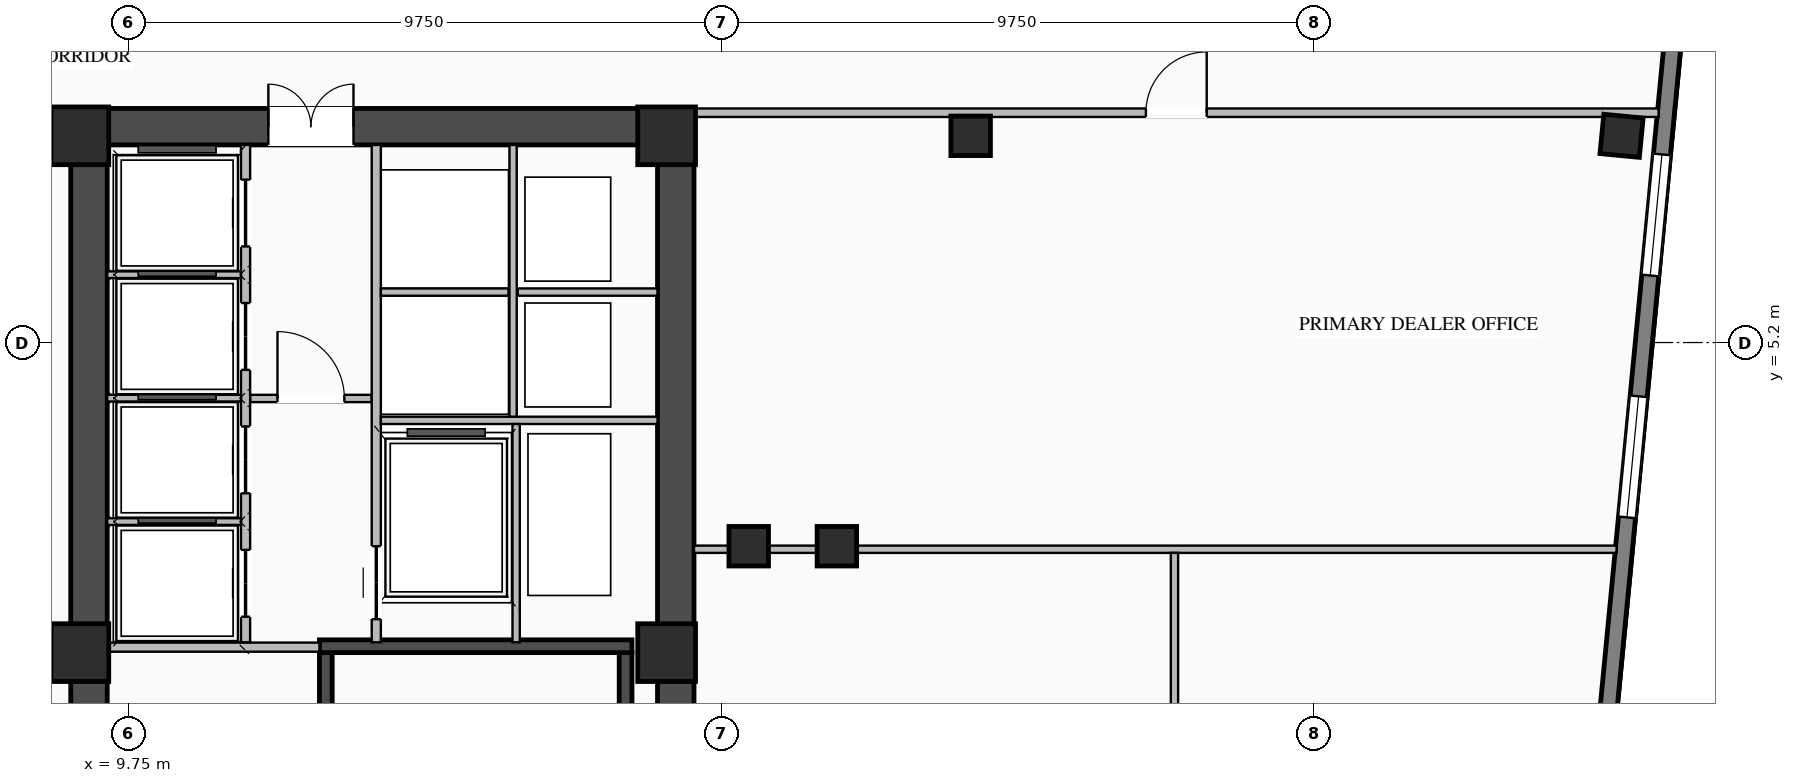
"""IFC4 building model, lengths in metres.
Left out: names, types, materials, properties, quantities, classifications, styles, units other than length and angle.
Written with IfcOpenShell. Run it as: python <this file> out.ifc"""

import sys

from ifc_helpers import new_model, si_unit, direction, frame, frame_2d, origin, origin_2d, place, context, subcontext, project, spatial, rectangle, i_section, extrude, element, fill, save


model = new_model("IFC4")
c1 = context("Model", 3, precision=1e-05, world=origin(), true_north=direction((0.0, 1.0)))
c2 = subcontext(c1, "Body", "Model", "MODEL_VIEW")
j1 = project(units=[si_unit("LENGTHUNIT", "METRE"), si_unit("PLANEANGLEUNIT", "RADIAN")], contexts=[c1])
p1 = place(None, origin())
s1 = spatial("IfcSite", under=j1, at=p1, CompositionType="ELEMENT")
p2 = place(p1, origin())
s2 = spatial("IfcBuilding", under=s1, at=p2, CompositionType="ELEMENT")
p3 = place(p2, frame((0.0, 0.0, 181.1)))
s3 = spatial("IfcBuildingStorey", under=s2, at=p3, CompositionType="ELEMENT", Elevation=181.1)
p4 = place(p3, frame((8.8, 8.75, 0.0), z_axis=(0.0, 0.0, 1.0), x_axis=(1.0, 0.0, 0.0)))
e1 = element("IfcWall", 1, at=p4, inside=s3, PredefinedType="SHEAR", context=c2, shape_type="SweptSolid", body=[
    extrude(rectangle(XDim=10.25, YDim=0.6, at=frame_2d((5.125, 0.0))), origin(), (0.0, 0.0, 1.0), 3.27),
])
p5 = place(p4, frame((3.25, 0.0, 0.0)))
e2 = element("IfcOpeningElement", 2, at=p5, cuts=e1, PredefinedType="OPENING", context=c2, shape_type="SweptSolid", body=[
    extrude(rectangle(XDim=1.4, YDim=2.05, at=frame_2d((0.7, 1.025))), frame((0.0, 0.31, 0.0), z_axis=(0.0, -1.0, 0.0), x_axis=(1.0, 0.0, 0.0)), (0.0, 0.0, 1.0), 0.62),
])
p6 = place(p3, frame((9.1, -8.45, 0.0), z_axis=(0.0, 0.0, 1.0), x_axis=(0.0, 1.0, 0.0)))
e3 = element("IfcWall", 3, at=p6, inside=s3, PredefinedType="SHEAR", context=c2, shape_type="SweptSolid", body=[
    extrude(rectangle(XDim=16.9, YDim=0.6, at=frame_2d((8.45, 0.0))), origin(), (0.0, 0.0, 1.0), 3.27),
])
p7 = place(p6, frame((5.2, 0.0, 0.0)))
e4 = element("IfcOpeningElement", 4, at=p7, cuts=e3, PredefinedType="OPENING", context=c2, shape_type="SweptSolid", body=[
    extrude(rectangle(XDim=1.1, YDim=2.08, at=frame_2d((0.55, 1.04))), frame((0.0, 0.31, 0.0), z_axis=(0.0, -1.0, 0.0), x_axis=(1.0, 0.0, 0.0)), (0.0, 0.0, 1.0), 0.62),
])
p8 = place(p3, frame((18.75, -8.45, 0.0), z_axis=(0.0, 0.0, 1.0), x_axis=(0.0, 1.0, 0.0)))
e5 = element("IfcWall", 5, at=p8, inside=s3, PredefinedType="SHEAR", context=c2, shape_type="SweptSolid", body=[
    extrude(rectangle(XDim=16.9, YDim=0.6, at=frame_2d((8.45, 0.0))), origin(), (0.0, 0.0, 1.0), 3.27),
])
p9 = place(p3, frame((12.995, -8.1, 0.0), z_axis=(0.0, 0.0, 1.0), x_axis=(0.0, 1.0, 0.0)))
e6 = element("IfcWall", 6, at=p9, inside=s3, PredefinedType="SHEAR", context=c2, shape_type="SweptSolid", body=[
    extrude(rectangle(XDim=8.2, YDim=0.21, at=frame_2d((4.1, 0.0))), origin(), (0.0, 0.0, 1.0), 3.27),
])
p10 = place(p9, frame((6.25, 0.0, 0.0)))
e7 = element("IfcOpeningElement", 7, at=p10, cuts=e6, PredefinedType="OPENING", context=c2, shape_type="SweptSolid", body=[
    extrude(rectangle(XDim=1.1, YDim=2.15, at=frame_2d((0.55, 1.075))), frame((0.0, 0.115, 0.0), z_axis=(0.0, -1.0, 0.0), x_axis=(1.0, 0.0, 0.0)), (0.0, 0.0, 1.0), 0.23),
])
p11 = place(p3, frame((17.925, -8.1, 0.0), z_axis=(0.0, 0.0, 1.0), x_axis=(0.0, 1.0, 0.0)))
e8 = element("IfcWall", 8, at=p11, inside=s3, PredefinedType="SHEAR", context=c2, shape_type="SweptSolid", body=[
    extrude(rectangle(XDim=8.2, YDim=0.21, at=frame_2d((4.1, 0.0))), origin(), (0.0, 0.0, 1.0), 3.27),
])
p12 = place(p3, frame((18.03, 0.205, 0.0), z_axis=(0.0, 0.0, 1.0), x_axis=(-1.0, 0.0, 0.0)))
e9 = element("IfcWall", 9, at=p12, inside=s3, PredefinedType="SHEAR", context=c2, shape_type="SweptSolid", body=[
    extrude(rectangle(XDim=5.14, YDim=0.21, at=frame_2d((2.57, 0.0))), origin(), (0.0, 0.0, 1.0), 3.27),
])
for number, where, z_axis, x_axis in (
    (10, (8.95, 0.1, 0.0), (0.0, 0.0, 1.0), (1.0, 0.0, 0.0)),
    (11, (8.95, 8.6, 0.0), (0.0, 0.0, 1.0), (1.0, 0.0, 0.0)),
    (12, (18.6, 0.1, 0.0), (0.0, 0.0, 1.0), (1.0, 0.0, 0.0)),
    (13, (18.6, 8.6, 0.0), (0.0, 0.0, 1.0), (1.0, 0.0, 0.0)),
):
    element("IfcColumn", number, at=place(p3, frame(where, z_axis=z_axis, x_axis=x_axis)), inside=s3, PredefinedType="COLUMN", context=c2, shape_type="SweptSolid", body=[
        extrude(rectangle(XDim=0.95, YDim=0.95, at=origin_2d()), origin(), (0.0, 0.0, 1.0), 3.45),
    ])
for number, where, z_axis, x_axis in (
    (14, (19.95, 1.85, 0.0), (0.0, 0.0, 1.0), (1.0, 0.0, 0.0)),
    (15, (21.4, 1.85, 0.0), (0.0, 0.0, 1.0), (1.0, 0.0, 0.0)),
    (16, (23.6, 8.6, 0.0), (0.0, 0.0, 1.0), (1.0, 0.0, 0.0)),
    (17, (34.305, 8.6, 0.0), (0.0, 0.0, 1.0), (0.995, -0.096, 0.0)),
):
    element("IfcColumn", number, at=place(p3, frame(where, z_axis=z_axis, x_axis=x_axis)), inside=s3, PredefinedType="COLUMN", context=c2, shape_type="SweptSolid", body=[
        extrude(i_section(OverallWidth=0.65, OverallDepth=0.65, WebThickness=0.028, FlangeThickness=0.04, at=origin_2d()), origin(), (0.0, 0.0, 1.0), 3.45),
    ])
p13 = place(p3, frame((35.51, 13.914, 0.0), z_axis=(0.0, 0.0, 1.0), x_axis=(-0.095839027265, -0.995396845913, 0.0)))
e18 = element("IfcWall", 18, at=p13, inside=s3, PredefinedType="STANDARD", context=c2, shape_type="SweptSolid", body=[
    extrude(rectangle(XDim=16.79, YDim=0.28, at=frame_2d((8.395, 0.0))), origin(), (0.0, 0.0, 1.0), 3.25),
])
p14 = place(p13, frame((5.647, 0.0, 0.76)))
e19 = element("IfcOpeningElement", 19, at=p14, cuts=e18, PredefinedType="OPENING", context=c2, shape_type="SweptSolid", body=[
    extrude(rectangle(XDim=2.0, YDim=2.05, at=frame_2d((1.0, 1.025))), frame((0.0, 0.15, 0.0), z_axis=(0.0, -1.0, 0.0), x_axis=(1.0, 0.0, 0.0)), (0.0, 0.0, 1.0), 0.3),
])
p15 = place(p13, frame((9.643, 0.0, 0.76)))
e20 = element("IfcOpeningElement", 20, at=p15, cuts=e18, PredefinedType="OPENING", context=c2, shape_type="SweptSolid", body=[
    extrude(rectangle(XDim=2.0, YDim=2.05, at=frame_2d((1.0, 1.025))), frame((0.0, 0.15, 0.0), z_axis=(0.0, -1.0, 0.0), x_axis=(1.0, 0.0, 0.0)), (0.0, 0.0, 1.0), 0.3),
])
p16 = place(p3, frame((9.4, 0.19, 0.0), z_axis=(0.0, 0.0, 1.0), x_axis=(1.0, 0.0, 0.0)))
e21 = element("IfcWall", 21, at=p16, inside=s3, PredefinedType="STANDARD", context=c2, shape_type="SweptSolid", body=[
    extrude(rectangle(XDim=3.49, YDim=0.15, at=frame_2d((1.745, 0.0))), origin(), (0.0, 0.0, 1.0), 2.645),
])
p17 = place(p3, frame((11.75, 4.28, 0.0), z_axis=(0.0, 0.0, 1.0), x_axis=(1.0, 0.0, 0.0)))
e22 = element("IfcWall", 22, at=p17, inside=s3, PredefinedType="STANDARD", context=c2, shape_type="SweptSolid", body=[
    extrude(rectangle(XDim=2.0, YDim=0.12, at=frame_2d((1.0, 0.0))), origin(), (0.0, 0.0, 1.0), 3.25),
])
p18 = place(p17, frame((0.45, 0.0, 0.0)))
e23 = element("IfcOpeningElement", 23, at=p18, cuts=e22, PredefinedType="OPENING", context=c2, shape_type="SweptSolid", body=[
    extrude(rectangle(XDim=1.1, YDim=2.1, at=frame_2d((0.55, 1.05))), frame((0.0, 0.07, 0.0), z_axis=(0.0, -1.0, 0.0), x_axis=(1.0, 0.0, 0.0)), (0.0, 0.0, 1.0), 0.14),
])
p19 = place(p3, frame((11.675, 0.27, 0.0), z_axis=(0.0, 0.0, 1.0), x_axis=(0.0, 1.0, 0.0)))
e24 = element("IfcWall", 24, at=p19, inside=s3, PredefinedType="STANDARD", context=c2, shape_type="SweptSolid", body=[
    extrude(rectangle(XDim=8.18, YDim=0.15, at=frame_2d((4.09, 0.0))), origin(), (0.0, 0.0, 1.0), 3.25),
])
p20 = place(p19, frame((0.42, 0.0, 0.0)))
e25 = element("IfcOpeningElement", 25, at=p20, cuts=e24, PredefinedType="OPENING", context=c2, shape_type="SweptSolid", body=[
    extrude(rectangle(XDim=1.1, YDim=2.1, at=frame_2d((0.55, 1.05))), frame((0.0, 0.085, 0.0), z_axis=(0.0, -1.0, 0.0), x_axis=(1.0, 0.0, 0.0)), (0.0, 0.0, 1.0), 0.17),
])
p21 = place(p19, frame((2.45, 0.0, 0.0)))
e26 = element("IfcOpeningElement", 26, at=p21, cuts=e24, PredefinedType="OPENING", context=c2, shape_type="SweptSolid", body=[
    extrude(rectangle(XDim=1.1, YDim=2.1, at=frame_2d((0.55, 1.05))), frame((0.0, 0.085, 0.0), z_axis=(0.0, -1.0, 0.0), x_axis=(1.0, 0.0, 0.0)), (0.0, 0.0, 1.0), 0.17),
])
p22 = place(p19, frame((4.48, 0.0, 0.0)))
e27 = element("IfcOpeningElement", 27, at=p22, cuts=e24, PredefinedType="OPENING", context=c2, shape_type="SweptSolid", body=[
    extrude(rectangle(XDim=1.1, YDim=2.1, at=frame_2d((0.55, 1.05))), frame((0.0, 0.085, 0.0), z_axis=(0.0, -1.0, 0.0), x_axis=(1.0, 0.0, 0.0)), (0.0, 0.0, 1.0), 0.17),
])
p23 = place(p19, frame((6.51, 0.0, 0.0)))
e28 = element("IfcOpeningElement", 28, at=p23, cuts=e24, PredefinedType="OPENING", context=c2, shape_type="SweptSolid", body=[
    extrude(rectangle(XDim=1.1, YDim=2.1, at=frame_2d((0.55, 1.05))), frame((0.0, 0.085, 0.0), z_axis=(0.0, -1.0, 0.0), x_axis=(1.0, 0.0, 0.0)), (0.0, 0.0, 1.0), 0.17),
])
for number, where, z_axis, x_axis in (
    (29, (9.4, 2.255, 0.0), (0.0, 0.0, 1.0), (1.0, 0.0, 0.0)),
    (30, (9.4, 4.285, 0.0), (0.0, 0.0, 1.0), (1.0, 0.0, 0.0)),
    (31, (9.4, 6.315, 0.0), (0.0, 0.0, 1.0), (1.0, 0.0, 0.0)),
):
    element("IfcWall", number, at=place(p3, frame(where, z_axis=z_axis, x_axis=x_axis)), inside=s3, PredefinedType="STANDARD", context=c2, shape_type="SweptSolid", body=[
        extrude(rectangle(XDim=2.2, YDim=0.11, at=frame_2d((1.1, 0.0))), origin(), (0.0, 0.0, 1.0), 3.25),
    ])
p24 = place(p3, frame((13.825, 0.27, 0.0), z_axis=(0.0, 0.0, 1.0), x_axis=(0.0, 1.0, 0.0)))
e32 = element("IfcWall", 32, at=p24, inside=s3, PredefinedType="STANDARD", context=c2, shape_type="SweptSolid", body=[
    extrude(rectangle(XDim=8.18, YDim=0.15, at=frame_2d((4.09, 0.0))), origin(), (0.0, 0.0, 1.0), 3.25),
])
p25 = place(p24, frame((0.38, 0.0, 0.0)))
e33 = element("IfcOpeningElement", 33, at=p25, cuts=e32, PredefinedType="OPENING", context=c2, shape_type="SweptSolid", body=[
    extrude(rectangle(XDim=1.2, YDim=2.1, at=frame_2d((0.6, 1.05))), frame((0.0, 0.085, 0.0), z_axis=(0.0, -1.0, 0.0), x_axis=(1.0, 0.0, 0.0)), (0.0, 0.0, 1.0), 0.17),
])
p26 = place(p3, frame((13.9, 3.92, 0.0), z_axis=(0.0, 0.0, 1.0), x_axis=(1.0, 0.0, 0.0)))
e34 = element("IfcWall", 34, at=p26, inside=s3, PredefinedType="STANDARD", context=c2, shape_type="SweptSolid", body=[
    extrude(rectangle(XDim=4.55, YDim=0.12, at=frame_2d((2.275, 0.0))), origin(), (0.0, 0.0, 1.0), 3.25),
])
p27 = place(p3, frame((16.15, 6.03, 0.0), z_axis=(0.0, 0.0, 1.0), x_axis=(1.0, 0.0, 0.0)))
e35 = element("IfcWall", 35, at=p27, inside=s3, PredefinedType="STANDARD", context=c2, shape_type="SweptSolid", body=[
    extrude(rectangle(XDim=2.3, YDim=0.12, at=frame_2d((1.15, 0.0))), origin(), (0.0, 0.0, 1.0), 3.25),
])
p28 = place(p3, frame((16.075, 3.98, 0.0), z_axis=(0.0, 0.0, 1.0), x_axis=(0.0, 1.0, 0.0)))
e36 = element("IfcWall", 36, at=p28, inside=s3, PredefinedType="STANDARD", context=c2, shape_type="SweptSolid", body=[
    extrude(rectangle(XDim=4.47, YDim=0.12, at=frame_2d((2.235, 0.0))), origin(), (0.0, 0.0, 1.0), 3.25),
])
p29 = place(p3, frame((13.9, 6.03, 0.0), z_axis=(0.0, 0.0, 1.0), x_axis=(1.0, 0.0, 0.0)))
e37 = element("IfcWall", 37, at=p29, inside=s3, PredefinedType="STANDARD", context=c2, shape_type="SweptSolid", body=[
    extrude(rectangle(XDim=2.1, YDim=0.12, at=frame_2d((1.05, 0.0))), origin(), (0.0, 0.0, 1.0), 3.25),
])
p30 = place(p3, frame((16.125, 0.27, 0.0), z_axis=(0.0, 0.0, 1.0), x_axis=(0.0, 1.0, 0.0)))
e38 = element("IfcWall", 38, at=p30, inside=s3, PredefinedType="STANDARD", context=c2, shape_type="SweptSolid", body=[
    extrude(rectangle(XDim=3.59, YDim=0.12, at=frame_2d((1.795, 0.0))), origin(), (0.0, 0.0, 1.0), 3.25),
])
p31 = place(p3, frame((19.05, 8.98, 0.0), z_axis=(0.0, 0.0, 1.0), x_axis=(1.0, 0.0, 0.0)))
e39 = element("IfcWall", 39, at=p31, inside=s3, PredefinedType="STANDARD", context=c2, shape_type="SweptSolid", body=[
    extrude(rectangle(XDim=15.864, YDim=0.14, at=frame_2d((7.932, 0.0))), origin(), (0.0, 0.0, 1.0), 3.25),
])
p32 = place(p31, frame((7.432, 0.0, 0.0)))
e40 = element("IfcOpeningElement", 40, at=p32, cuts=e39, PredefinedType="OPENING", context=c2, shape_type="SweptSolid", body=[
    extrude(rectangle(XDim=1.0, YDim=2.08, at=frame_2d((0.5, 1.04))), frame((0.0, 0.08, 0.0), z_axis=(0.0, -1.0, 0.0), x_axis=(1.0, 0.0, 0.0)), (0.0, 0.0, 1.0), 0.16),
])
p33 = place(p3, frame((19.05, 1.8, 0.0), z_axis=(0.0, 0.0, 1.0), x_axis=(1.0, 0.0, 0.0)))
e41 = element("IfcWall", 41, at=p33, inside=s3, PredefinedType="STANDARD", context=c2, shape_type="SweptSolid", body=[
    extrude(rectangle(XDim=15.173, YDim=0.12, at=frame_2d((7.586, 0.0))), origin(), (0.0, 0.0, 1.0), 3.25),
])
p34 = place(p3, frame((26.952, -8.98, 0.0), z_axis=(0.0, 0.0, 1.0), x_axis=(0.0, 1.0, 0.0)))
e42 = element("IfcWall", 42, at=p34, inside=s3, PredefinedType="STANDARD", context=c2, shape_type="SweptSolid", body=[
    extrude(rectangle(XDim=10.72, YDim=0.12, at=frame_2d((5.36, 0.0))), origin(), (0.0, 0.0, 1.0), 3.25),
])
p35 = place(p14, origin())
e43 = element("IfcWindow", 43, at=p35, inside=s3, PartitioningType="DOUBLE_PANEL_VERTICAL", PredefinedType="WINDOW", context=c2, shape_type="SweptSolid", body=[
    extrude(rectangle(XDim=2.0, YDim=2.05, at=frame_2d((1.0, 1.025))), frame((0.0, 0.03, 0.0), z_axis=(0.0, -1.0, 0.0), x_axis=(1.0, 0.0, 0.0)), (0.0, 0.0, 1.0), 0.06),
])
fill(e19, e43)
p36 = place(p15, origin())
e44 = element("IfcWindow", 44, at=p36, inside=s3, PartitioningType="DOUBLE_PANEL_VERTICAL", PredefinedType="WINDOW", context=c2, shape_type="SweptSolid", body=[
    extrude(rectangle(XDim=2.0, YDim=2.05, at=frame_2d((1.0, 1.025))), frame((0.0, 0.03, 0.0), z_axis=(0.0, -1.0, 0.0), x_axis=(1.0, 0.0, 0.0)), (0.0, 0.0, 1.0), 0.06),
])
fill(e20, e44)
p37 = place(p18, origin())
e45 = element("IfcDoor", 45, at=p37, inside=s3, OperationType="SINGLE_SWING_LEFT", PredefinedType="DOOR", context=c2, shape_type="SweptSolid", body=[
    extrude(rectangle(XDim=1.1, YDim=2.1, at=frame_2d((0.55, 1.05))), frame((0.0, 0.025, 0.0), z_axis=(0.0, -1.0, 0.0), x_axis=(1.0, 0.0, 0.0)), (0.0, 0.0, 1.0), 0.05),
])
fill(e23, e45)
p38 = place(p5, origin())
e46 = element("IfcDoor", 46, at=p38, inside=s3, OperationType="DOUBLE_DOOR_SINGLE_SWING", PredefinedType="DOOR", context=c2, shape_type="SweptSolid", body=[
    extrude(rectangle(XDim=1.4, YDim=2.05, at=frame_2d((0.7, 1.025))), frame((0.0, 0.245, 0.0), z_axis=(0.0, -1.0, 0.0), x_axis=(1.0, 0.0, 0.0)), (0.0, 0.0, 1.0), 0.05),
])
fill(e2, e46)
p39 = place(p20, origin())
e47 = element("IfcDoor", 47, at=p39, inside=s3, OperationType="DOUBLE_DOOR_SLIDING", PredefinedType="DOOR", context=c2, shape_type="SweptSolid", body=[
    extrude(rectangle(XDim=1.1, YDim=2.1, at=frame_2d((0.55, 1.05))), frame((0.0, 0.025, 0.0), z_axis=(0.0, -1.0, 0.0), x_axis=(1.0, 0.0, 0.0)), (0.0, 0.0, 1.0), 0.05),
])
fill(e25, e47)
p40 = place(p21, origin())
e48 = element("IfcDoor", 48, at=p40, inside=s3, OperationType="DOUBLE_DOOR_SLIDING", PredefinedType="DOOR", context=c2, shape_type="SweptSolid", body=[
    extrude(rectangle(XDim=1.1, YDim=2.1, at=frame_2d((0.55, 1.05))), frame((0.0, 0.025, 0.0), z_axis=(0.0, -1.0, 0.0), x_axis=(1.0, 0.0, 0.0)), (0.0, 0.0, 1.0), 0.05),
])
fill(e26, e48)
p41 = place(p22, origin())
e49 = element("IfcDoor", 49, at=p41, inside=s3, OperationType="DOUBLE_DOOR_SLIDING", PredefinedType="DOOR", context=c2, shape_type="SweptSolid", body=[
    extrude(rectangle(XDim=1.1, YDim=2.1, at=frame_2d((0.55, 1.05))), frame((0.0, 0.025, 0.0), z_axis=(0.0, -1.0, 0.0), x_axis=(1.0, 0.0, 0.0)), (0.0, 0.0, 1.0), 0.05),
])
fill(e27, e49)
p42 = place(p23, origin())
e50 = element("IfcDoor", 50, at=p42, inside=s3, OperationType="DOUBLE_DOOR_SLIDING", PredefinedType="DOOR", context=c2, shape_type="SweptSolid", body=[
    extrude(rectangle(XDim=1.1, YDim=2.1, at=frame_2d((0.55, 1.05))), frame((0.0, 0.025, 0.0), z_axis=(0.0, -1.0, 0.0), x_axis=(1.0, 0.0, 0.0)), (0.0, 0.0, 1.0), 0.05),
])
fill(e28, e50)
p43 = place(p25, origin())
e51 = element("IfcDoor", 51, at=p43, inside=s3, OperationType="DOUBLE_DOOR_SLIDING", PredefinedType="DOOR", context=c2, shape_type="SweptSolid", body=[
    extrude(rectangle(XDim=1.2, YDim=2.1, at=frame_2d((0.6, 1.05))), frame((0.0, 0.025, 0.0), z_axis=(0.0, -1.0, 0.0), x_axis=(1.0, 0.0, 0.0)), (0.0, 0.0, 1.0), 0.05),
])
fill(e33, e51)
p44 = place(p32, origin())
e52 = element("IfcDoor", 52, at=p44, inside=s3, OperationType="SINGLE_SWING_RIGHT", PredefinedType="DOOR", context=c2, shape_type="SweptSolid", body=[
    extrude(rectangle(XDim=1.0, YDim=2.08, at=frame_2d((0.5, 1.04))), frame((0.0, 0.025, 0.0), z_axis=(0.0, -1.0, 0.0), x_axis=(1.0, 0.0, 0.0)), (0.0, 0.0, 1.0), 0.05),
])
fill(e40, e52)
save(model, sys.argv[1])
